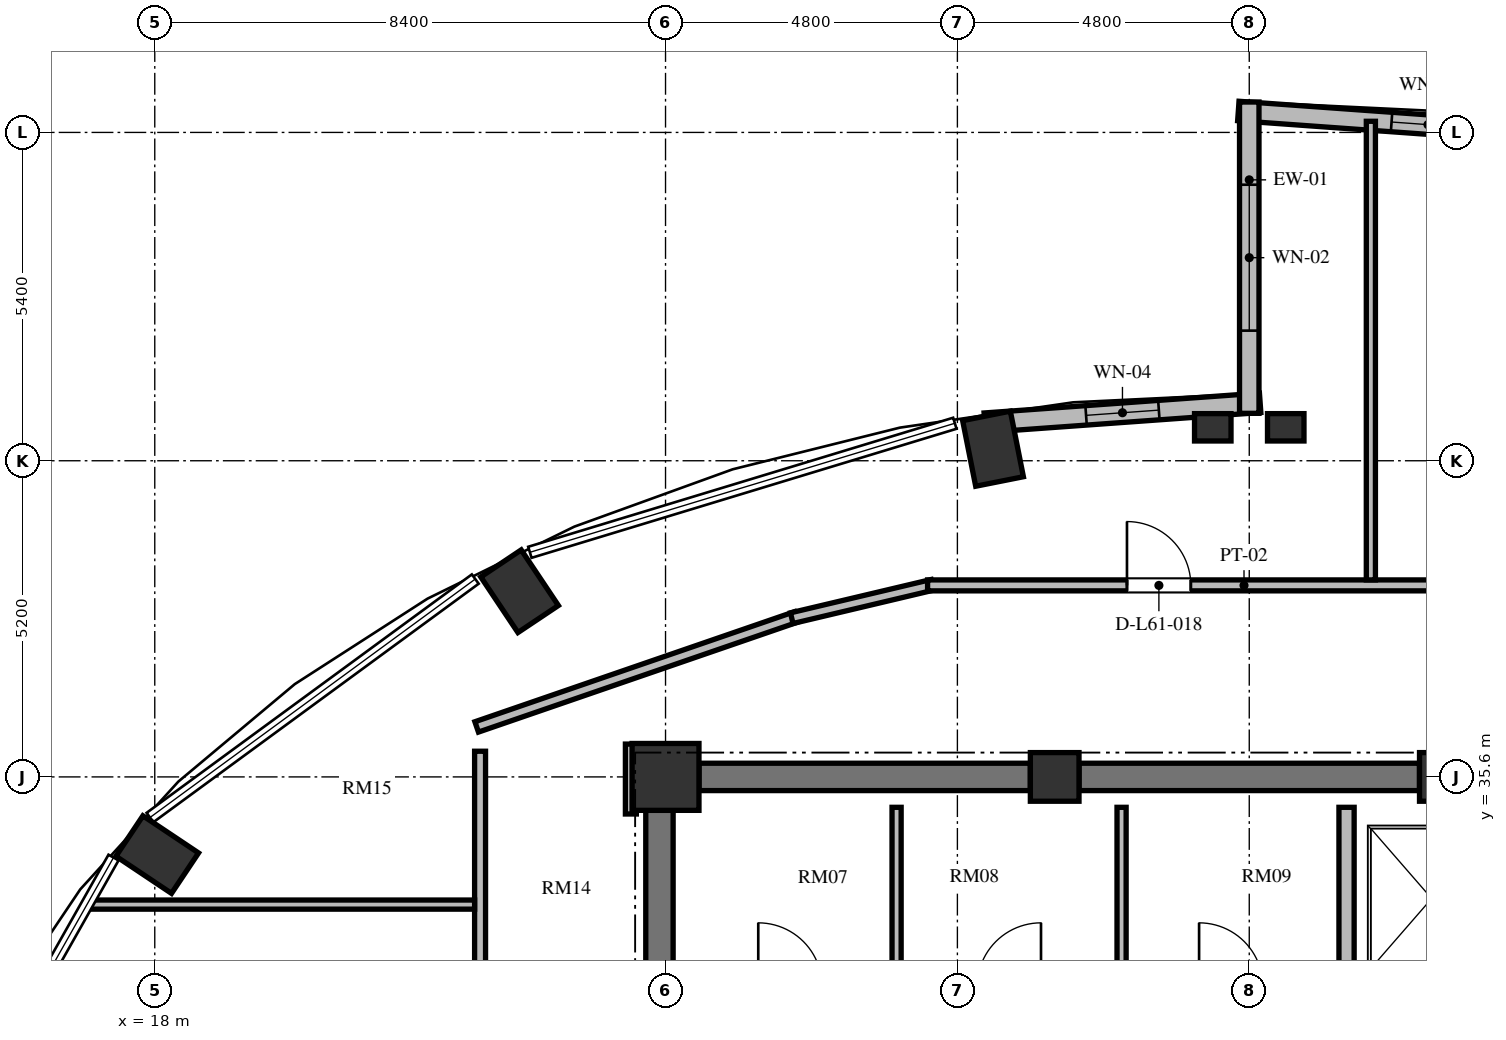
"""IFC4 building model, lengths in metres.
Left out: names, types, materials, properties, quantities, classifications, styles, units other than length and angle.
Written with IfcOpenShell. Run it as: python <this file> out.ifc"""

import sys

from ifc_helpers import new_model, si_unit, direction, frame, frame_2d, origin, origin_2d, place, context, subcontext, project, spatial, rectangle, extrude, element, fill, save


model = new_model("IFC4")
c1 = context("Model", 3, precision=1e-05, world=origin(), true_north=direction((0.0, 1.0)))
c2 = subcontext(c1, "Body", "Model", "MODEL_VIEW")
j1 = project(units=[si_unit("LENGTHUNIT", "METRE"), si_unit("PLANEANGLEUNIT", "RADIAN")], contexts=[c1])
p1 = place(None, origin())
s1 = spatial("IfcSite", under=j1, at=p1, CompositionType="ELEMENT")
p2 = place(p1, origin())
s2 = spatial("IfcBuilding", under=s1, at=p2, CompositionType="ELEMENT")
p3 = place(p2, frame((0.0, 0.0, 234.96)))
s3 = spatial("IfcBuildingStorey", under=s2, at=p3, CompositionType="ELEMENT", Elevation=234.96)
for number, where, z_axis, x_axis in (
    (1, (31.786, 40.998, 0.0), (0.0, 0.0, 1.0), (-0.195, 0.981, 0.0)),
    (2, (24.0, 38.654, 0.0), (0.0, 0.0, 1.0), (-0.556, 0.831, 0.0)),
    (3, (18.04, 34.323, 0.0), (0.0, 0.0, 1.0), (-0.831, 0.556, 0.0)),
):
    element("IfcColumn", number, at=place(p3, frame(where, z_axis=z_axis, x_axis=x_axis)), inside=s3, PredefinedType="COLUMN", context=c2, shape_type="SweptSolid", body=[
        extrude(rectangle(XDim=1.1, YDim=0.8, at=origin_2d()), origin(), (0.0, 0.0, 1.0), 3.648),
    ])
for number, where, z_axis, x_axis in (
    (4, (39.2, 35.6, 0.0), (0.0, 0.0, 1.0), (1.0, 0.0, 0.0)),
    (5, (32.8, 35.6, 0.0), (0.0, 0.0, 1.0), (1.0, 0.0, 0.0)),
):
    element("IfcColumn", number, at=place(p3, frame(where, z_axis=z_axis, x_axis=x_axis)), inside=s3, PredefinedType="COLUMN", context=c2, shape_type="SweptSolid", body=[
        extrude(rectangle(XDim=0.8, YDim=0.8, at=origin_2d()), origin(), (0.0, 0.0, 1.0), 3.648),
    ])
p4 = place(p3, frame((26.4, 35.6, 0.0), z_axis=(0.0, 0.0, 1.0), x_axis=(1.0, 0.0, 0.0)))
e6 = element("IfcColumn", 6, at=p4, inside=s3, PredefinedType="COLUMN", context=c2, shape_type="SweptSolid", body=[
    extrude(rectangle(XDim=1.1, YDim=1.1, at=origin_2d()), origin(), (0.0, 0.0, 1.0), 3.648),
])
for number, where, z_axis, x_axis in (
    (7, (35.4, 41.35, 0.0), (0.0, 0.0, 1.0), (1.0, 0.0, 0.0)),
    (8, (36.6, 41.35, 0.0), (0.0, 0.0, 1.0), (1.0, 0.0, 0.0)),
):
    element("IfcColumn", number, at=place(p3, frame(where, z_axis=z_axis, x_axis=x_axis)), inside=s3, PredefinedType="PILASTER", context=c2, shape_type="SweptSolid", body=[
        extrude(rectangle(XDim=0.6, YDim=0.45, at=origin_2d()), origin(), (0.0, 0.0, 1.0), 3.648),
    ])
p5 = place(p3, frame((26.3, 20.95, 0.0), z_axis=(0.0, 0.0, 1.0), x_axis=(0.0, 1.0, 0.0)))
e9 = element("IfcWall", 9, at=p5, inside=s3, PredefinedType="SHEAR", context=c2, shape_type="SweptSolid", body=[
    extrude(rectangle(XDim=14.1, YDim=0.45, at=frame_2d((7.05, 0.0))), origin(), (0.0, 0.0, 1.0), 3.648),
])
p6 = place(p5, frame((6.5, 0.0, 0.0)))
e10 = element("IfcOpeningElement", 10, at=p6, cuts=e9, PredefinedType="OPENING", context=c2, shape_type="SweptSolid", body=[
    extrude(rectangle(XDim=1.2, YDim=2.15, at=frame_2d((0.6, 1.075))), frame((0.0, 0.235, 0.0), z_axis=(0.0, -1.0, 0.0), x_axis=(1.0, 0.0, 0.0)), (0.0, 0.0, 1.0), 0.47),
])
p7 = place(p5, frame((9.6, 0.0, 0.0)))
e11 = element("IfcOpeningElement", 11, at=p7, cuts=e9, PredefinedType="OPENING", context=c2, shape_type="SweptSolid", body=[
    extrude(rectangle(XDim=1.3, YDim=2.2, at=frame_2d((0.65, 1.1))), frame((0.0, 0.235, 0.0), z_axis=(0.0, -1.0, 0.0), x_axis=(1.0, 0.0, 0.0)), (0.0, 0.0, 1.0), 0.47),
])
p8 = place(p5, frame((3.26, 0.0, 0.0)))
e12 = element("IfcOpeningElement", 12, at=p8, cuts=e9, PredefinedType="OPENING", context=c2, shape_type="SweptSolid", body=[
    extrude(rectangle(XDim=1.3, YDim=2.2, at=frame_2d((0.65, 1.1))), frame((0.0, 0.235, 0.0), z_axis=(0.0, -1.0, 0.0), x_axis=(1.0, 0.0, 0.0)), (0.0, 0.0, 1.0), 0.47),
])
p9 = place(p3, frame((26.95, 35.6, 0.0), z_axis=(0.0, 0.0, 1.0), x_axis=(1.0, 0.0, 0.0)))
e13 = element("IfcWall", 13, at=p9, inside=s3, PredefinedType="SHEAR", context=c2, shape_type="SweptSolid", body=[
    extrude(rectangle(XDim=5.45, YDim=0.45, at=frame_2d((2.725, 0.0))), origin(), (0.0, 0.0, 1.0), 3.648),
])
p10 = place(p3, frame((33.2, 35.6, 0.0), z_axis=(0.0, 0.0, 1.0), x_axis=(1.0, 0.0, 0.0)))
e14 = element("IfcWall", 14, at=p10, inside=s3, PredefinedType="SHEAR", context=c2, shape_type="SweptSolid", body=[
    extrude(rectangle(XDim=5.6, YDim=0.45, at=frame_2d((2.8, 0.0))), origin(), (0.0, 0.0, 1.0), 3.648),
])
p11 = place(p3, frame((40.35, 46.226, 0.0), z_axis=(0.0, 0.0, 1.0), x_axis=(-0.997409061056, 0.071938619141, 0.0)))
e15 = element("IfcWall", 15, at=p11, inside=s3, PredefinedType="SOLIDWALL", context=c2, shape_type="SweptSolid", body=[
    extrude(rectangle(XDim=4.541, YDim=0.32, at=frame_2d((2.271, 0.0))), origin(), (0.0, 0.0, 1.0), 3.448),
])
p12 = place(p11, frame((0.815, 0.0, 0.85)))
e16 = element("IfcOpeningElement", 16, at=p12, cuts=e15, PredefinedType="OPENING", context=c2, shape_type="SweptSolid", body=[
    extrude(rectangle(XDim=1.2, YDim=2.2, at=frame_2d((0.6, 1.1))), frame((0.0, 0.17, 0.0), z_axis=(0.0, -1.0, 0.0), x_axis=(1.0, 0.0, 0.0)), (0.0, 0.0, 1.0), 0.34),
])
p13 = place(p3, frame((36.179, 41.753, 0.0), z_axis=(0.0, 0.0, 1.0), x_axis=(-0.997408782787, -0.071942477163, 0.0)))
e17 = element("IfcWall", 17, at=p13, inside=s3, PredefinedType="SOLIDWALL", context=c2, shape_type="SweptSolid", body=[
    extrude(rectangle(XDim=4.541, YDim=0.32, at=frame_2d((2.27, 0.0))), origin(), (0.0, 0.0, 1.0), 3.448),
])
p14 = place(p13, frame((1.67, 0.0, 0.85)))
e18 = element("IfcOpeningElement", 18, at=p14, cuts=e17, PredefinedType="OPENING", context=c2, shape_type="SweptSolid", body=[
    extrude(rectangle(XDim=1.2, YDim=1.8, at=frame_2d((0.6, 0.9))), frame((0.0, 0.17, 0.0), z_axis=(0.0, -1.0, 0.0), x_axis=(1.0, 0.0, 0.0)), (0.0, 0.0, 1.0), 0.34),
])
p15 = place(p3, frame((36.0, 46.7, 0.0), z_axis=(0.0, 0.0, 1.0), x_axis=(0.0, -1.0, 0.0)))
e19 = element("IfcWall", 19, at=p15, inside=s3, PredefinedType="SOLIDWALL", context=c2, shape_type="SweptSolid", body=[
    extrude(rectangle(XDim=5.12, YDim=0.32, at=frame_2d((2.56, 0.0))), origin(), (0.0, 0.0, 1.0), 3.448),
])
p16 = place(p15, frame((1.36, 0.0, 0.84)))
e20 = element("IfcOpeningElement", 20, at=p16, cuts=e19, PredefinedType="OPENING", context=c2, shape_type="SweptSolid", body=[
    extrude(rectangle(XDim=2.4, YDim=2.04, at=frame_2d((1.2, 1.02))), frame((0.0, 0.17, 0.0), z_axis=(0.0, -1.0, 0.0), x_axis=(1.0, 0.0, 0.0)), (0.0, 0.0, 1.0), 0.34),
])
p17 = place(p3, frame((37.6, 32.42, 0.0), z_axis=(0.0, 0.0, 1.0), x_axis=(0.0, 1.0, 0.0)))
e21 = element("IfcWall", 21, at=p17, inside=s3, PredefinedType="SOLIDWALL", context=c2, shape_type="SweptSolid", body=[
    extrude(rectangle(XDim=2.68, YDim=0.25, at=frame_2d((1.34, 0.0))), origin(), (0.0, 0.0, 1.0), 3.448),
])
for number, where, z_axis, x_axis in (
    (22, (30.2, 32.42, 0.0), (0.0, 0.0, 1.0), (0.0, 1.0, 0.0)),
    (23, (33.9, 32.42, 0.0), (0.0, 0.0, 1.0), (0.0, 1.0, 0.0)),
):
    element("IfcWall", number, at=place(p3, frame(where, z_axis=z_axis, x_axis=x_axis)), inside=s3, PredefinedType="PARTITIONING", context=c2, shape_type="SweptSolid", body=[
        extrude(rectangle(XDim=2.68, YDim=0.15, at=frame_2d((1.34, 0.0))), origin(), (0.0, 0.0, 1.0), 3.448),
    ])
p18 = place(p3, frame((23.294, 36.422, 0.0), z_axis=(0.0, 0.0, 1.0), x_axis=(0.945493277461, 0.325641616316, 0.0)))
e24 = element("IfcWall", 24, at=p18, inside=s3, PredefinedType="PARTITIONING", context=c2, shape_type="SweptSolid", body=[
    extrude(rectangle(XDim=5.562, YDim=0.18, at=frame_2d((2.781, 0.0))), origin(), (0.0, 0.0, 1.0), 3.073),
])
p19 = place(p3, frame((28.476, 38.211, 0.0), z_axis=(0.0, 0.0, 1.0), x_axis=(0.973030562203, 0.230676234189, 0.0)))
e25 = element("IfcWall", 25, at=p19, inside=s3, PredefinedType="PARTITIONING", context=c2, shape_type="SweptSolid", body=[
    extrude(rectangle(XDim=2.377, YDim=0.18, at=frame_2d((1.188, 0.0))), origin(), (0.0, 0.0, 1.0), 3.448),
])
p20 = place(p3, frame((30.71, 38.75, 0.0), z_axis=(0.0, 0.0, 1.0), x_axis=(1.0, 0.0, 0.0)))
e26 = element("IfcWall", 26, at=p20, inside=s3, PredefinedType="PARTITIONING", context=c2, shape_type="SweptSolid", body=[
    extrude(rectangle(XDim=20.815, YDim=0.18, at=frame_2d((10.408, 0.0))), origin(), (0.0, 0.0, 1.0), 3.073),
])
p21 = place(p20, frame((13.194, 0.0, 0.0)))
e27 = element("IfcOpeningElement", 27, at=p21, cuts=e26, PredefinedType="OPENING", context=c2, shape_type="SweptSolid", body=[
    extrude(rectangle(XDim=1.4, YDim=2.2, at=frame_2d((0.7, 1.1))), frame((0.0, 0.1, 0.0), z_axis=(0.0, -1.0, 0.0), x_axis=(1.0, 0.0, 0.0)), (0.0, 0.0, 1.0), 0.2),
])
p22 = place(p20, frame((3.279, 0.0, 0.0)))
e28 = element("IfcOpeningElement", 28, at=p22, cuts=e26, PredefinedType="OPENING", context=c2, shape_type="SweptSolid", body=[
    extrude(rectangle(XDim=1.05, YDim=2.15, at=frame_2d((0.525, 1.075))), frame((0.0, 0.1, 0.0), z_axis=(0.0, -1.0, 0.0), x_axis=(1.0, 0.0, 0.0)), (0.0, 0.0, 1.0), 0.2),
])
p23 = place(p3, frame((25.83, 36.14, 0.0), z_axis=(0.0, 0.0, 1.0), x_axis=(0.0, -1.0, 0.0)))
e29 = element("IfcWall", 29, at=p23, inside=s3, PredefinedType="PARTITIONING", context=c2, shape_type="SweptSolid", body=[
    extrude(rectangle(XDim=1.15, YDim=0.18, at=frame_2d((0.575, 0.0))), origin(), (0.0, 0.0, 1.0), 3.448),
])
p24 = place(p3, frame((23.35, 19.98, 0.0), z_axis=(0.0, 0.0, 1.0), x_axis=(0.0, 1.0, 0.0)))
e30 = element("IfcWall", 30, at=p24, inside=s3, PredefinedType="PARTITIONING", context=c2, shape_type="SweptSolid", body=[
    extrude(rectangle(XDim=16.042, YDim=0.18, at=frame_2d((8.021, 0.0))), origin(), (0.0, 0.0, 1.0), 3.448),
])
p25 = place(p24, frame((5.477, 0.0, 0.0)))
e31 = element("IfcOpeningElement", 31, at=p25, cuts=e30, PredefinedType="OPENING", context=c2, shape_type="SweptSolid", body=[
    extrude(rectangle(XDim=1.05, YDim=2.15, at=frame_2d((0.525, 1.075))), frame((0.0, 0.1, 0.0), z_axis=(0.0, -1.0, 0.0), x_axis=(1.0, 0.0, 0.0)), (0.0, 0.0, 1.0), 0.2),
])
p26 = place(p24, frame((1.219, 0.0, 0.0)))
e32 = element("IfcOpeningElement", 32, at=p26, cuts=e30, PredefinedType="OPENING", context=c2, shape_type="SweptSolid", body=[
    extrude(rectangle(XDim=1.4, YDim=2.2, at=frame_2d((0.7, 1.1))), frame((0.0, 0.1, 0.0), z_axis=(0.0, -1.0, 0.0), x_axis=(1.0, 0.0, 0.0)), (0.0, 0.0, 1.0), 0.2),
])
p27 = place(p24, frame((10.511, 0.0, 0.0)))
e33 = element("IfcOpeningElement", 33, at=p27, cuts=e30, PredefinedType="OPENING", context=c2, shape_type="SweptSolid", body=[
    extrude(rectangle(XDim=1.05, YDim=2.15, at=frame_2d((0.525, 1.075))), frame((0.0, 0.1, 0.0), z_axis=(0.0, -1.0, 0.0), x_axis=(1.0, 0.0, 0.0)), (0.0, 0.0, 1.0), 0.2),
])
p28 = place(p3, frame((16.895, 33.5, 0.0), z_axis=(0.0, 0.0, 1.0), x_axis=(1.0, 0.0, 0.0)))
e34 = element("IfcWall", 34, at=p28, inside=s3, PredefinedType="PARTITIONING", context=c2, shape_type="SweptSolid", body=[
    extrude(rectangle(XDim=6.365, YDim=0.15, at=frame_2d((3.183, 0.0))), origin(), (0.0, 0.0, 1.0), 3.448),
])
p29 = place(p3, frame((38.0, 38.84, 0.0), z_axis=(0.0, 0.0, 1.0), x_axis=(0.0, 1.0, 0.0)))
e35 = element("IfcWall", 35, at=p29, inside=s3, PredefinedType="PARTITIONING", context=c2, shape_type="SweptSolid", body=[
    extrude(rectangle(XDim=7.543, YDim=0.15, at=frame_2d((3.771, 0.0))), origin(), (0.0, 0.0, 1.0), 3.448),
])
p30 = place(p12, origin())
e36 = element("IfcWindow", 36, at=p30, inside=s3, PartitioningType="SINGLE_PANEL", PredefinedType="WINDOW", context=c2, shape_type="SweptSolid", body=[
    extrude(rectangle(XDim=1.2, YDim=2.2, at=frame_2d((0.6, 1.1))), frame((0.0, 0.03, 0.0), z_axis=(0.0, -1.0, 0.0), x_axis=(1.0, 0.0, 0.0)), (0.0, 0.0, 1.0), 0.06),
])
fill(e16, e36)
p31 = place(p14, origin())
e37 = element("IfcWindow", 37, at=p31, inside=s3, PartitioningType="SINGLE_PANEL", PredefinedType="WINDOW", context=c2, shape_type="SweptSolid", body=[
    extrude(rectangle(XDim=1.2, YDim=1.8, at=frame_2d((0.6, 0.9))), frame((0.0, 0.03, 0.0), z_axis=(0.0, -1.0, 0.0), x_axis=(1.0, 0.0, 0.0)), (0.0, 0.0, 1.0), 0.06),
])
fill(e18, e37)
p32 = place(p16, origin())
e38 = element("IfcWindow", 38, at=p32, inside=s3, PartitioningType="SINGLE_PANEL", PredefinedType="WINDOW", context=c2, shape_type="SweptSolid", body=[
    extrude(rectangle(XDim=2.4, YDim=2.04, at=frame_2d((1.2, 1.02))), frame((0.0, 0.03, 0.0), z_axis=(0.0, -1.0, 0.0), x_axis=(1.0, 0.0, 0.0)), (0.0, 0.0, 1.0), 0.06),
])
fill(e20, e38)
p33 = place(p22, origin())
e39 = element("IfcDoor", 39, at=p33, inside=s3, OperationType="SINGLE_SWING_LEFT", PredefinedType="DOOR", context=c2, shape_type="SweptSolid", body=[
    extrude(rectangle(XDim=1.05, YDim=2.15, at=frame_2d((0.525, 1.075))), frame((0.0, 0.025, 0.0), z_axis=(0.0, -1.0, 0.0), x_axis=(1.0, 0.0, 0.0)), (0.0, 0.0, 1.0), 0.05),
])
fill(e28, e39)
save(model, sys.argv[1])
